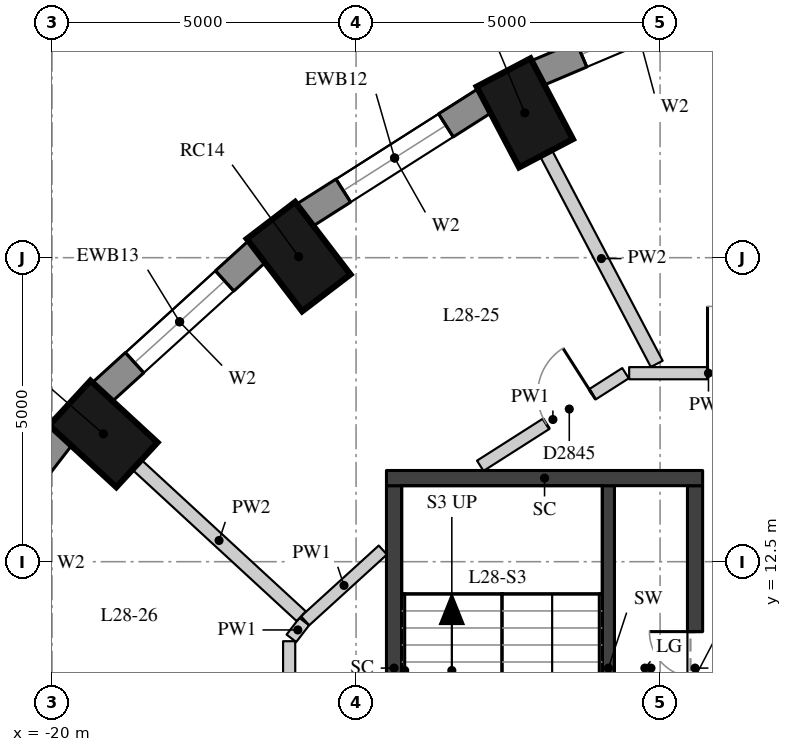
"""IFC4 building model, lengths in metres.
Left out: names, types, materials, properties, quantities, classifications, styles, units other than length and angle.
Written with IfcOpenShell. Run it as: python <this file> out.ifc"""

import sys

from ifc_helpers import new_model, si_unit, direction, frame, frame_2d, origin, origin_2d, place, context, subcontext, project, spatial, rectangle, extrude, element, fill, save


model = new_model("IFC4")
c1 = context("Model", 3, precision=1e-05, world=origin(), true_north=direction((0.0, 1.0)))
c2 = subcontext(c1, "Body", "Model", "MODEL_VIEW")
j1 = project(units=[si_unit("LENGTHUNIT", "METRE"), si_unit("PLANEANGLEUNIT", "RADIAN")], contexts=[c1])
p1 = place(None, origin())
s1 = spatial("IfcSite", under=j1, at=p1, CompositionType="ELEMENT")
p2 = place(p1, origin())
s2 = spatial("IfcBuilding", under=s1, at=p2, CompositionType="ELEMENT")
p3 = place(p2, frame((0.0, 0.0, 102.1)))
s3 = spatial("IfcBuildingStorey", under=s2, at=p3, CompositionType="ELEMENT", Elevation=102.1)
for number, where, z_axis, x_axis in (
    (1, (-12.225, 19.882, 0.0), (0.0, 0.0, 1.0), (-0.465, 0.885, 0.0)),
    (2, (-15.945, 17.517, 0.0), (0.0, 0.0, 1.0), (-0.607, 0.795, 0.0)),
    (3, (-19.156, 14.602, 0.0), (0.0, 0.0, 1.0), (-0.735, 0.678, 0.0)),
):
    element("IfcColumn", number, at=place(p3, frame(where, z_axis=z_axis, x_axis=x_axis)), inside=s3, PredefinedType="COLUMN", context=c2, shape_type="SweptSolid", body=[
        extrude(rectangle(XDim=1.5, YDim=1.0, at=origin_2d()), origin(), (0.0, 0.0, 1.0), 3.3),
    ])
p4 = place(p3, frame((-8.718, 21.934, 0.0), z_axis=(0.0, 0.0, 1.0), x_axis=(-0.920879975612, -0.389846213932, 0.0)))
e4 = element("IfcWall", 4, at=p4, inside=s3, PredefinedType="SOLIDWALL", context=c2, shape_type="SweptSolid", body=[
    extrude(rectangle(XDim=3.592, YDim=0.45, at=frame_2d((1.796, 0.0))), origin(), (0.0, 0.0, 1.0), 3.02),
])
p5 = place(p4, frame((0.796, 0.0, 0.4)))
e5 = element("IfcOpeningElement", 5, at=p5, cuts=e4, PredefinedType="OPENING", context=c2, shape_type="SweptSolid", body=[
    extrude(rectangle(XDim=2.0, YDim=1.75, at=frame_2d((1.0, 0.875))), frame((0.0, 0.235, 0.0), z_axis=(0.0, -1.0, 0.0), x_axis=(1.0, 0.0, 0.0)), (0.0, 0.0, 1.0), 0.47),
])
p6 = place(p3, frame((-12.875, 20.087, 0.0), z_axis=(0.0, 0.0, 1.0), x_axis=(-0.843860651879, -0.536562391722, 0.0)))
e6 = element("IfcWall", 6, at=p6, inside=s3, PredefinedType="SOLIDWALL", context=c2, shape_type="SweptSolid", body=[
    extrude(rectangle(XDim=3.532, YDim=0.45, at=frame_2d((1.766, 0.0))), origin(), (0.0, 0.0, 1.0), 3.02),
])
p7 = place(p6, frame((0.766, 0.0, 0.4)))
e7 = element("IfcOpeningElement", 7, at=p7, cuts=e6, PredefinedType="OPENING", context=c2, shape_type="SweptSolid", body=[
    extrude(rectangle(XDim=2.0, YDim=1.75, at=frame_2d((1.0, 0.875))), frame((0.0, 0.235, 0.0), z_axis=(0.0, -1.0, 0.0), x_axis=(1.0, 0.0, 0.0)), (0.0, 0.0, 1.0), 0.47),
])
p8 = place(p3, frame((-16.62, 17.61, 0.0), z_axis=(0.0, 0.0, 1.0), x_axis=(-0.74032902847, -0.672244694739, 0.0)))
e8 = element("IfcWall", 8, at=p8, inside=s3, PredefinedType="SOLIDWALL", context=c2, shape_type="SweptSolid", body=[
    extrude(rectangle(XDim=3.464, YDim=0.45, at=frame_2d((1.732, 0.0))), origin(), (0.0, 0.0, 1.0), 3.02),
])
p9 = place(p8, frame((0.732, 0.0, 0.4)))
e9 = element("IfcOpeningElement", 9, at=p9, cuts=e8, PredefinedType="OPENING", context=c2, shape_type="SweptSolid", body=[
    extrude(rectangle(XDim=2.0, YDim=1.75, at=frame_2d((1.0, 0.875))), frame((0.0, 0.235, 0.0), z_axis=(0.0, -1.0, 0.0), x_axis=(1.0, 0.0, 0.0)), (0.0, 0.0, 1.0), 0.47),
])
p10 = place(p3, frame((-19.835, 14.575, 0.0), z_axis=(0.0, 0.0, 1.0), x_axis=(-0.610693945156, -0.791866721961, 0.0)))
e10 = element("IfcWall", 10, at=p10, inside=s3, PredefinedType="SOLIDWALL", context=c2, shape_type="SweptSolid", body=[
    extrude(rectangle(XDim=3.395, YDim=0.45, at=frame_2d((1.697, 0.0))), origin(), (0.0, 0.0, 1.0), 3.02),
])
p11 = place(p10, frame((0.697, 0.0, 0.4)))
e11 = element("IfcOpeningElement", 11, at=p11, cuts=e10, PredefinedType="OPENING", context=c2, shape_type="SweptSolid", body=[
    extrude(rectangle(XDim=2.0, YDim=1.75, at=frame_2d((1.0, 0.875))), frame((0.0, 0.235, 0.0), z_axis=(0.0, -1.0, 0.0), x_axis=(1.0, 0.0, 0.0)), (0.0, 0.0, 1.0), 0.47),
])
p12 = place(p3, frame((-10.85, 7.75, 0.0), z_axis=(0.0, 0.0, 1.0), x_axis=(0.0, 1.0, 0.0)))
e12 = element("IfcWall", 12, at=p12, inside=s3, PredefinedType="SHEAR", context=c2, shape_type="SweptSolid", body=[
    extrude(rectangle(XDim=6.0, YDim=0.2, at=frame_2d((3.0, 0.0))), origin(), (0.0, 0.0, 1.0), 3.02),
])
p13 = place(p12, frame((0.1, 0.0, 0.0)))
e13 = element("IfcOpeningElement", 13, at=p13, cuts=e12, PredefinedType="OPENING", context=c2, shape_type="SweptSolid", body=[
    extrude(rectangle(XDim=1.5, YDim=2.1, at=frame_2d((0.75, 1.05))), frame((0.0, 0.11, 0.0), z_axis=(0.0, -1.0, 0.0), x_axis=(1.0, 0.0, 0.0)), (0.0, 0.0, 1.0), 0.22),
])
p14 = place(p3, frame((-14.375, 7.75, -0.28), z_axis=(0.0, 0.0, 1.0), x_axis=(0.0, 1.0, 0.0)))
e14 = element("IfcWall", 14, at=p14, inside=s3, PredefinedType="SHEAR", context=c2, shape_type="SweptSolid", body=[
    extrude(rectangle(XDim=6.0, YDim=0.25, at=frame_2d((3.0, 0.0))), origin(), (0.0, 0.0, 1.0), 3.3),
])
p15 = place(p3, frame((-9.425, 7.75, -0.28), z_axis=(0.0, 0.0, 1.0), x_axis=(0.0, 1.0, 0.0)))
e15 = element("IfcWall", 15, at=p15, inside=s3, PredefinedType="SHEAR", context=c2, shape_type="SweptSolid", body=[
    extrude(rectangle(XDim=6.0, YDim=0.25, at=frame_2d((3.0, 0.0))), origin(), (0.0, 0.0, 1.0), 3.3),
])
p16 = place(p15, frame((2.1, 0.0, 0.28)))
e16 = element("IfcOpeningElement", 16, at=p16, cuts=e15, PredefinedType="OPENING", context=c2, shape_type="SweptSolid", body=[
    extrude(rectangle(XDim=1.5, YDim=2.1, at=frame_2d((0.75, 1.05))), frame((0.0, 0.135, 0.0), z_axis=(0.0, -1.0, 0.0), x_axis=(1.0, 0.0, 0.0)), (0.0, 0.0, 1.0), 0.27),
])
p17 = place(p3, frame((-14.5, 13.875, -0.28), z_axis=(0.0, 0.0, 1.0), x_axis=(1.0, 0.0, 0.0)))
e17 = element("IfcWall", 17, at=p17, inside=s3, PredefinedType="SHEAR", context=c2, shape_type="SweptSolid", body=[
    extrude(rectangle(XDim=5.2, YDim=0.25, at=frame_2d((2.6, 0.0))), origin(), (0.0, 0.0, 1.0), 3.3),
])
p18 = place(p3, frame((-16.1, 6.0, 0.0), z_axis=(0.0, 0.0, 1.0), x_axis=(0.0, 1.0, 0.0)))
e18 = element("IfcWall", 18, at=p18, inside=s3, PredefinedType="PARTITIONING", context=c2, shape_type="SweptSolid", body=[
    extrude(rectangle(XDim=5.192, YDim=0.2, at=frame_2d((2.596, 0.0))), origin(), (0.0, 0.0, 1.0), 3.02),
])
p19 = place(p18, frame((2.857, 0.0, 0.0)))
e19 = element("IfcOpeningElement", 19, at=p19, cuts=e18, PredefinedType="OPENING", context=c2, shape_type="SweptSolid", body=[
    extrude(rectangle(XDim=0.9, YDim=2.1, at=frame_2d((0.45, 1.05))), frame((0.0, 0.11, 0.0), z_axis=(0.0, -1.0, 0.0), x_axis=(1.0, 0.0, 0.0)), (0.0, 0.0, 1.0), 0.22),
])
p20 = place(p18, frame((0.22, 0.0, 0.0)))
e20 = element("IfcOpeningElement", 20, at=p20, cuts=e18, PredefinedType="OPENING", context=c2, shape_type="SweptSolid", body=[
    extrude(rectangle(XDim=0.9, YDim=2.1, at=frame_2d((0.45, 1.05))), frame((0.0, 0.11, 0.0), z_axis=(0.0, -1.0, 0.0), x_axis=(1.0, 0.0, 0.0)), (0.0, 0.0, 1.0), 0.22),
])
p21 = place(p3, frame((-16.063, 11.24, 0.0), z_axis=(0.0, 0.0, 1.0), x_axis=(0.609744747854, 0.792597844096, 0.0)))
e21 = element("IfcWall", 21, at=p21, inside=s3, PredefinedType="PARTITIONING", context=c2, shape_type="SweptSolid", body=[
    extrude(rectangle(XDim=0.347, YDim=0.2, at=frame_2d((0.174, 0.0))), origin(), (0.0, 0.0, 1.0), 3.02),
])
p22 = place(p3, frame((-15.837, 11.528, 0.0), z_axis=(0.0, 0.0, 1.0), x_axis=(0.739402681643, 0.673263450946, 0.0)))
e22 = element("IfcWall", 22, at=p22, inside=s3, PredefinedType="PARTITIONING", context=c2, shape_type="SweptSolid", body=[
    extrude(rectangle(XDim=1.728, YDim=0.2, at=frame_2d((0.864, 0.0))), origin(), (0.0, 0.0, 1.0), 3.02),
])
p23 = place(p3, frame((-12.957, 14.077, 0.0), z_axis=(0.0, 0.0, 1.0), x_axis=(0.84319985174, 0.537600232538, 0.0)))
e23 = element("IfcWall", 23, at=p23, inside=s3, PredefinedType="PARTITIONING", context=c2, shape_type="SweptSolid", body=[
    extrude(rectangle(XDim=2.833, YDim=0.2, at=frame_2d((1.417, 0.0))), origin(), (0.0, 0.0, 1.0), 3.02),
])
p24 = place(p23, frame((1.286, 0.0, 0.0)))
e24 = element("IfcOpeningElement", 24, at=p24, cuts=e23, PredefinedType="OPENING", context=c2, shape_type="SweptSolid", body=[
    extrude(rectangle(XDim=0.9, YDim=2.1, at=frame_2d((0.45, 1.05))), frame((0.0, 0.11, 0.0), z_axis=(0.0, -1.0, 0.0), x_axis=(1.0, 0.0, 0.0)), (0.0, 0.0, 1.0), 0.22),
])
p25 = place(p3, frame((-10.509, 15.6, 0.0), z_axis=(0.0, 0.0, 1.0), x_axis=(1.0, 0.0, 0.0)))
e25 = element("IfcWall", 25, at=p25, inside=s3, PredefinedType="PARTITIONING", context=c2, shape_type="SweptSolid", body=[
    extrude(rectangle(XDim=2.609, YDim=0.2, at=frame_2d((1.304, 0.0))), origin(), (0.0, 0.0, 1.0), 3.02),
])
p26 = place(p25, frame((1.289, 0.0, 0.0)))
e26 = element("IfcOpeningElement", 26, at=p26, cuts=e25, PredefinedType="OPENING", context=c2, shape_type="SweptSolid", body=[
    extrude(rectangle(XDim=1.1, YDim=2.1, at=frame_2d((0.55, 1.05))), frame((0.0, 0.11, 0.0), z_axis=(0.0, -1.0, 0.0), x_axis=(1.0, 0.0, 0.0)), (0.0, 0.0, 1.0), 0.22),
])
p27 = place(p3, frame((-11.876, 19.218, 0.0), z_axis=(0.0, 0.0, 1.0), x_axis=(0.465386433174, -0.885107602395, 0.0)))
e27 = element("IfcWall", 27, at=p27, inside=s3, PredefinedType="PARTITIONING", context=c2, shape_type="SweptSolid", body=[
    extrude(rectangle(XDim=3.914, YDim=0.22, at=frame_2d((1.957, 0.0))), origin(), (0.0, 0.0, 1.0), 3.02),
])
p28 = place(p3, frame((-18.604, 14.094, 0.0), z_axis=(0.0, 0.0, 1.0), x_axis=(0.73529495628, -0.677747244383, 0.0)))
e28 = element("IfcWall", 28, at=p28, inside=s3, PredefinedType="PARTITIONING", context=c2, shape_type="SweptSolid", body=[
    extrude(rectangle(XDim=3.674, YDim=0.22, at=frame_2d((1.837, 0.0))), origin(), (0.0, 0.0, 1.0), 3.02),
])
p29 = place(p3, frame((-21.126, 10.823, 0.0), z_axis=(0.0, 0.0, 1.0), x_axis=(0.844518840625, -0.535525842355, 0.0)))
e29 = element("IfcWall", 29, at=p29, inside=s3, PredefinedType="PARTITIONING", context=c2, shape_type="SweptSolid", body=[
    extrude(rectangle(XDim=5.773, YDim=0.22, at=frame_2d((2.887, 0.0))), origin(), (0.0, 0.0, 1.0), 3.02),
])
p30 = place(p5, origin())
e30 = element("IfcWindow", 30, at=p30, inside=s3, PartitioningType="SINGLE_PANEL", PredefinedType="WINDOW", context=c2, shape_type="SweptSolid", body=[
    extrude(rectangle(XDim=2.0, YDim=1.75, at=frame_2d((1.0, 0.875))), frame((0.0, 0.035, 0.0), z_axis=(0.0, -1.0, 0.0), x_axis=(1.0, 0.0, 0.0)), (0.0, 0.0, 1.0), 0.06),
])
fill(e5, e30)
p31 = place(p7, origin())
e31 = element("IfcWindow", 31, at=p31, inside=s3, PartitioningType="SINGLE_PANEL", PredefinedType="WINDOW", context=c2, shape_type="SweptSolid", body=[
    extrude(rectangle(XDim=2.0, YDim=1.75, at=frame_2d((1.0, 0.875))), frame((0.0, 0.035, 0.0), z_axis=(0.0, -1.0, 0.0), x_axis=(1.0, 0.0, 0.0)), (0.0, 0.0, 1.0), 0.06),
])
fill(e7, e31)
p32 = place(p9, origin())
e32 = element("IfcWindow", 32, at=p32, inside=s3, PartitioningType="SINGLE_PANEL", PredefinedType="WINDOW", context=c2, shape_type="SweptSolid", body=[
    extrude(rectangle(XDim=2.0, YDim=1.75, at=frame_2d((1.0, 0.875))), frame((0.0, 0.035, 0.0), z_axis=(0.0, -1.0, 0.0), x_axis=(1.0, 0.0, 0.0)), (0.0, 0.0, 1.0), 0.06),
])
fill(e9, e32)
p33 = place(p16, origin())
e33 = element("IfcDoor", 33, at=p33, inside=s3, OperationType="DOUBLE_DOOR_SINGLE_SWING", PredefinedType="DOOR", context=c2, shape_type="SweptSolid", body=[
    extrude(rectangle(XDim=1.5, YDim=2.1, at=frame_2d((0.75, 1.05))), frame((0.0, 0.025, 0.0), z_axis=(0.0, -1.0, 0.0), x_axis=(1.0, 0.0, 0.0)), (0.0, 0.0, 1.0), 0.05),
])
fill(e16, e33)
p34 = place(p26, origin())
e34 = element("IfcDoor", 34, at=p34, inside=s3, OperationType="SINGLE_SWING_LEFT", PredefinedType="DOOR", context=c2, shape_type="SweptSolid", body=[
    extrude(rectangle(XDim=1.1, YDim=2.1, at=frame_2d((0.55, 1.05))), frame((0.0, 0.025, 0.0), z_axis=(0.0, -1.0, 0.0), x_axis=(1.0, 0.0, 0.0)), (0.0, 0.0, 1.0), 0.05),
])
fill(e26, e34)
p35 = place(p24, origin())
e35 = element("IfcDoor", 35, at=p35, inside=s3, OperationType="SINGLE_SWING_RIGHT", PredefinedType="DOOR", context=c2, shape_type="SweptSolid", body=[
    extrude(rectangle(XDim=0.9, YDim=2.1, at=frame_2d((0.45, 1.05))), frame((0.0, 0.025, 0.0), z_axis=(0.0, -1.0, 0.0), x_axis=(1.0, 0.0, 0.0)), (0.0, 0.0, 1.0), 0.05),
])
fill(e24, e35)
save(model, sys.argv[1])
